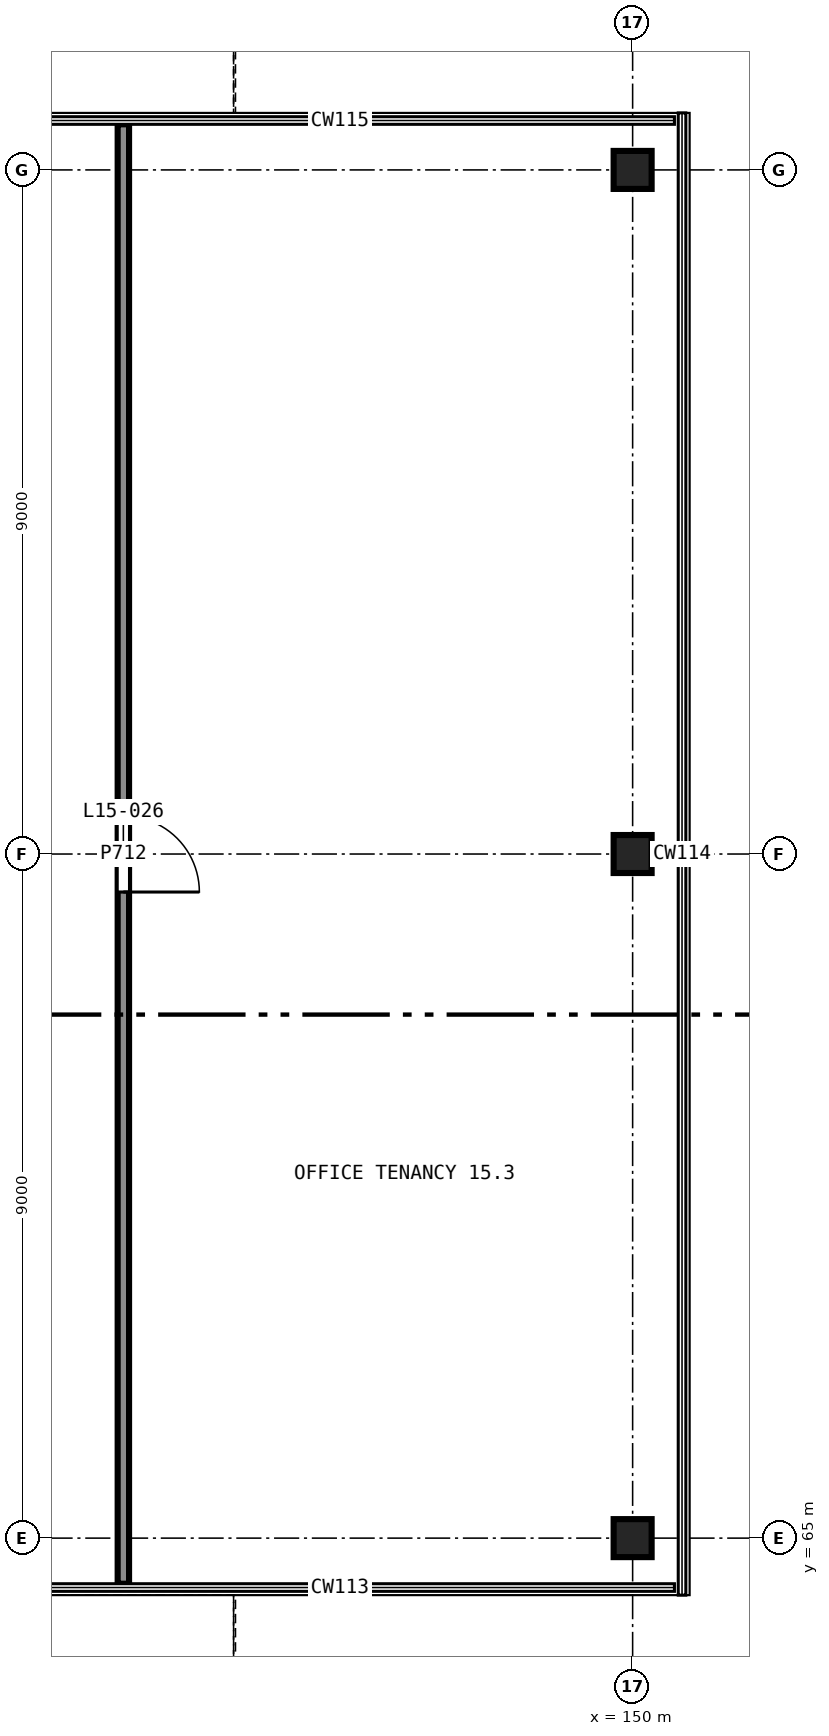
"""IFC4 building model, lengths in metres.
Left out: names, types, materials, properties, quantities, classifications, styles, units other than length and angle.
Written with IfcOpenShell. Run it as: python <this file> out.ifc"""

import sys

from ifc_helpers import new_model, si_unit, direction, frame, frame_2d, origin, origin_2d, place, context, subcontext, project, spatial, rectangle, extrude, element, fill, save


model = new_model("IFC4")
c1 = context("Model", 3, precision=1e-05, world=origin(), true_north=direction((0.0, 1.0)))
c2 = subcontext(c1, "Body", "Model", "MODEL_VIEW")
j1 = project(units=[si_unit("LENGTHUNIT", "METRE"), si_unit("PLANEANGLEUNIT", "RADIAN")], contexts=[c1])
p1 = place(None, origin())
s1 = spatial("IfcSite", under=j1, at=p1, CompositionType="ELEMENT")
p2 = place(p1, origin())
s2 = spatial("IfcBuilding", under=s1, at=p2, CompositionType="ELEMENT")
p3 = place(p2, frame((0.0, 0.0, 61.5)))
s3 = spatial("IfcBuildingStorey", under=s2, at=p3, CompositionType="ELEMENT", Elevation=61.5)
for number, where, z_axis, x_axis in (
    (1, (150.0, 65.0, 0.0), (0.0, 0.0, 1.0), (1.0, 0.0, 0.0)),
    (2, (150.0, 74.0, 0.0), (0.0, 0.0, 1.0), (1.0, 0.0, 0.0)),
    (3, (150.0, 83.0, 0.0), (0.0, 0.0, 1.0), (1.0, 0.0, 0.0)),
):
    element("IfcColumn", number, at=place(p3, frame(where, z_axis=z_axis, x_axis=x_axis)), inside=s3, PredefinedType="COLUMN", context=c2, shape_type="SweptSolid", body=[
        extrude(rectangle(XDim=0.5, YDim=0.5, at=origin_2d()), origin(), (0.0, 0.0, 1.0), 4.0),
    ])
p4 = place(p3, frame((143.3, 83.6, 0.0), z_axis=(0.0, 0.0, 1.0), x_axis=(0.0, -1.0, 0.0)))
e4 = element("IfcWall", 4, at=p4, inside=s3, PredefinedType="PARTITIONING", context=c2, shape_type="SweptSolid", body=[
    extrude(rectangle(XDim=19.2, YDim=0.15, at=frame_2d((9.6, 0.0))), origin(), (0.0, 0.0, 1.0), 3.58),
])
p5 = place(p4, frame((9.1, 0.0, 0.0)))
e5 = element("IfcOpeningElement", 5, at=p5, cuts=e4, PredefinedType="OPENING", context=c2, shape_type="SweptSolid", body=[
    extrude(rectangle(XDim=1.0, YDim=2.1, at=frame_2d((0.5, 1.05))), frame((0.0, 0.085, 0.0), z_axis=(0.0, -1.0, 0.0), x_axis=(1.0, 0.0, 0.0)), (0.0, 0.0, 1.0), 0.17),
])
p6 = place(p5, origin())
e6 = element("IfcDoor", 6, at=p6, inside=s3, OperationType="SINGLE_SWING_LEFT", PredefinedType="DOOR", context=c2, shape_type="SweptSolid", body=[
    extrude(rectangle(XDim=1.0, YDim=2.1, at=frame_2d((0.5, 1.05))), frame((0.0, 0.025, 0.0), z_axis=(0.0, -1.0, 0.0), x_axis=(1.0, 0.0, 0.0)), (0.0, 0.0, 1.0), 0.05),
])
fill(e5, e6)
save(model, sys.argv[1])
